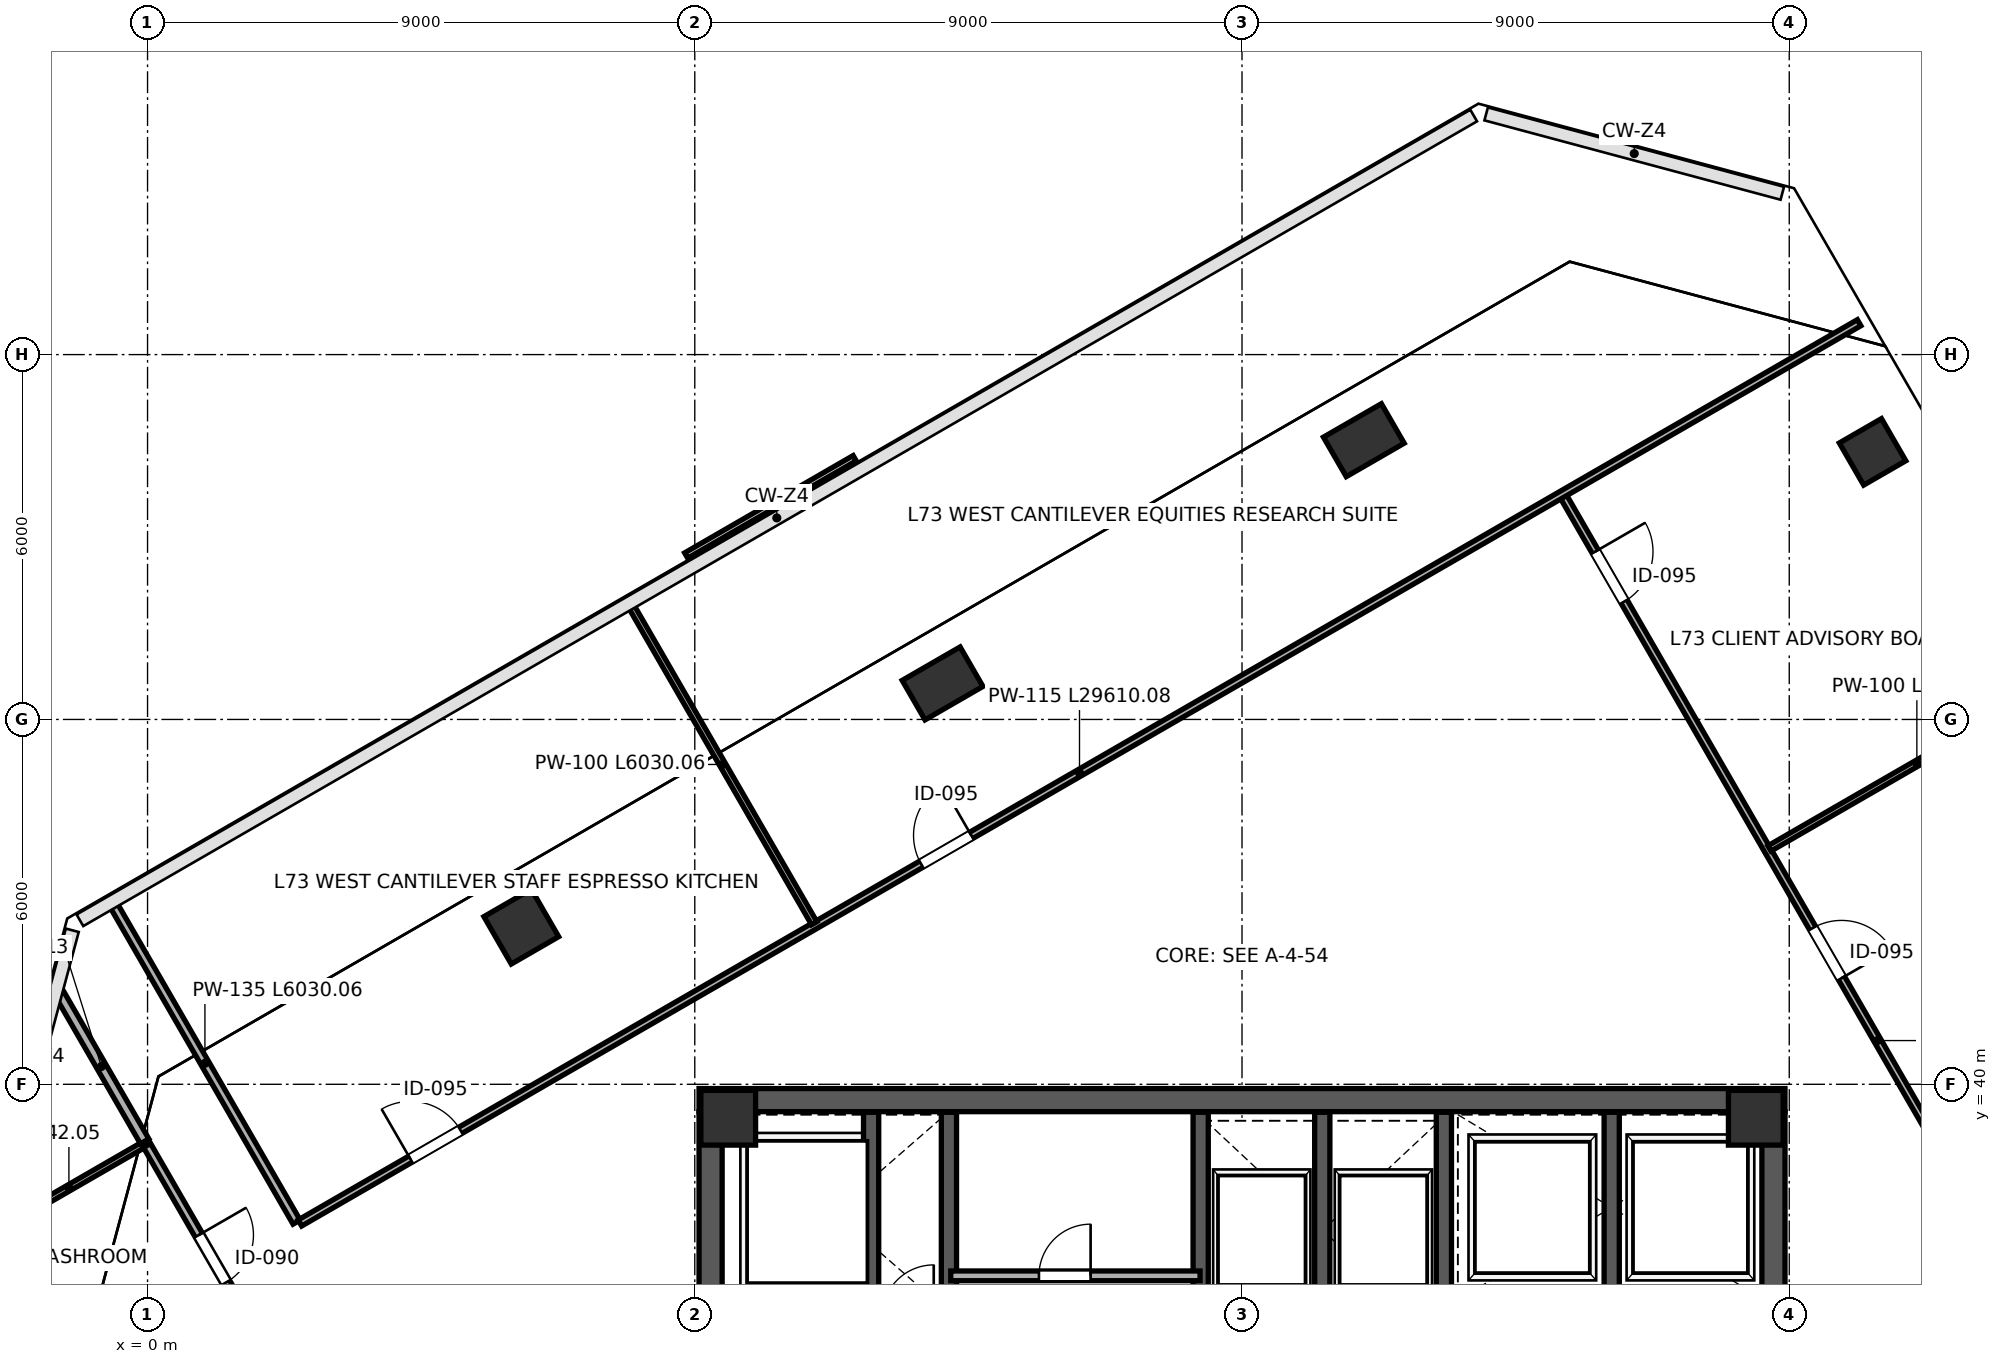
"""IFC4 building model, lengths in metres.
Left out: names, types, materials, properties, quantities, classifications, styles, units other than length and angle.
Written with IfcOpenShell. Run it as: python <this file> out.ifc"""

import sys

from ifc_helpers import new_model, si_unit, direction, frame, frame_2d, origin, origin_2d, place, context, subcontext, project, spatial, rectangle, extrude, clip, halfspace, source, transform, mapped, element, fill, save


model = new_model("IFC4")
c1 = context("Model", 3, precision=1e-05, world=origin(), true_north=direction((0.0, 1.0)))
c2 = subcontext(c1, "Body", "Model", "MODEL_VIEW")
j1 = project(units=[si_unit("LENGTHUNIT", "METRE"), si_unit("PLANEANGLEUNIT", "RADIAN")], contexts=[c1])
p1 = place(None, origin())
s1 = spatial("IfcSite", under=j1, at=p1, CompositionType="ELEMENT")
p2 = place(p1, origin())
s2 = spatial("IfcBuilding", under=s1, at=p2, CompositionType="ELEMENT")
p3 = place(p2, frame((0.0, 0.0, 324.0)))
s3 = spatial("IfcBuildingStorey", under=s2, at=p3, CompositionType="ELEMENT", Elevation=324.0)
m1 = source(origin(), c2, "Body", "SweptSolid", [
    extrude(rectangle(XDim=0.9, YDim=0.9, at=origin_2d()), origin(), (0.0, 0.0, 1.0), 4.198),
])
for number, where, z_axis, x_axis in (
    (1, (9.55, 39.45, 0.001), (0.0, 0.0, 1.0), (1.0, 0.0, 0.0)),
    (2, (26.45, 39.45, 0.001), (0.0, 0.0, 1.0), (1.0, 0.0, 0.0)),
):
    element("IfcColumn", number, at=place(p3, frame(where, z_axis=z_axis, x_axis=x_axis)), inside=s3, PredefinedType="COLUMN", context=c2, shape_type="MappedRepresentation", body=[
        mapped(m1, transform((0.0, 0.0, 0.0), scale=1.0)),
    ])
p4 = place(p3, frame((28.37, 50.4, 0.0), z_axis=(0.185732133875, -0.074042249015, 0.979806776771), x_axis=(-0.973368515453, -0.150232230162, 0.173158915868)))
e3 = element("IfcColumn", 3, at=p4, inside=s3, PredefinedType="COLUMN", context=c2, shape_type="Clipping", body=[
    clip(clip(extrude(rectangle(XDim=0.8, YDim=0.8, at=origin_2d()), origin(), (0.0, 0.0, 1.0), 4.287), halfspace(frame((0.0, 0.0, 0.112), z_axis=(0.0, 0.0, -1.0), x_axis=(1.0, 0.0, 0.0)), False)), halfspace(frame((0.0, 0.0, 4.174), z_axis=(0.0, 0.0, 1.0), x_axis=(1.0, 0.0, 0.0)), False)),
])
p5 = place(p3, frame((6.147, 42.593, 0.0), z_axis=(0.11139667023, 0.15419764496, 0.981740224372), x_axis=(-0.092584145067, -0.981981963783, 0.164741005482)))
e4 = element("IfcColumn", 4, at=p5, inside=s3, PredefinedType="COLUMN", context=c2, shape_type="Clipping", body=[
    clip(clip(extrude(rectangle(XDim=0.9, YDim=0.9, at=origin_2d()), origin(), (0.0, 0.0, 1.0), 4.278), halfspace(frame((0.0, 0.0, 0.12), z_axis=(0.0, 0.0, -1.0), x_axis=(1.0, 0.0, 0.0)), False)), halfspace(frame((0.0, 0.0, 4.158), z_axis=(0.0, 0.0, 1.0), x_axis=(1.0, 0.0, 0.0)), False)),
])
p6 = place(p3, frame((13.075, 46.593, 0.0), z_axis=(0.151163602868, 0.082910945816, 0.985025553086), x_axis=(-0.507491019711, -0.848622041952, 0.149310062709)))
e5 = element("IfcColumn", 5, at=p6, inside=s3, PredefinedType="PILASTER", context=c2, shape_type="Clipping", body=[
    clip(clip(extrude(rectangle(XDim=0.75, YDim=1.1, at=origin_2d()), origin(), (0.0, 0.0, 1.0), 4.264), halfspace(frame((0.0, 0.0, 0.106), z_axis=(0.0, 0.0, -1.0), x_axis=(1.0, 0.0, 0.0)), False)), halfspace(frame((0.0, 0.0, 4.158), z_axis=(0.0, 0.0, 1.0), x_axis=(1.0, 0.0, 0.0)), False)),
])
p7 = place(p3, frame((20.003, 50.593, 0.0), z_axis=(0.189921418402, 0.011128208109, 0.981736226191), x_axis=(-0.819506066676, -0.54887550505, 0.16475887423)))
e6 = element("IfcColumn", 6, at=p7, inside=s3, PredefinedType="PILASTER", context=c2, shape_type="Clipping", body=[
    clip(clip(extrude(rectangle(XDim=0.75, YDim=1.1, at=origin_2d()), origin(), (0.0, 0.0, 1.0), 4.278), halfspace(frame((0.0, 0.0, 0.117), z_axis=(0.0, 0.0, -1.0), x_axis=(1.0, 0.0, 0.0)), False)), halfspace(frame((0.0, 0.0, 4.161), z_axis=(0.0, 0.0, 1.0), x_axis=(1.0, 0.0, 0.0)), False)),
])
p8 = place(p3, frame((9.26, 24.45, 0.0), z_axis=(0.0, 0.0, 1.0), x_axis=(0.0, 1.0, 0.0)))
e7 = element("IfcWall", 7, at=p8, inside=s3, PredefinedType="SHEAR", context=c2, shape_type="SweptSolid", body=[
    extrude(rectangle(XDim=15.1, YDim=0.38, at=frame_2d((7.55, 0.0))), origin(), (0.0, 0.0, 1.0), 3.96),
])
p9 = place(p8, frame((8.7, 0.0, 0.0)))
e8 = element("IfcOpeningElement", 8, at=p9, cuts=e7, PredefinedType="OPENING", context=c2, shape_type="SweptSolid", body=[
    extrude(rectangle(XDim=1.15, YDim=2.2, at=frame_2d((0.575, 1.1))), frame((0.0, 0.2, 0.0), z_axis=(0.0, -1.0, 0.0), x_axis=(1.0, 0.0, 0.0)), (0.0, 0.0, 1.0), 0.4),
])
p10 = place(p3, frame((26.74, 24.45, 0.0), z_axis=(0.0, 0.0, 1.0), x_axis=(0.0, 1.0, 0.0)))
e9 = element("IfcWall", 9, at=p10, inside=s3, PredefinedType="SHEAR", context=c2, shape_type="SweptSolid", body=[
    extrude(rectangle(XDim=15.1, YDim=0.38, at=frame_2d((7.55, 0.0))), origin(), (0.0, 0.0, 1.0), 3.96),
])
p11 = place(p10, frame((8.6, 0.0, 0.0)))
e10 = element("IfcOpeningElement", 10, at=p11, cuts=e9, PredefinedType="OPENING", context=c2, shape_type="SweptSolid", body=[
    extrude(rectangle(XDim=1.15, YDim=2.2, at=frame_2d((0.575, 1.1))), frame((0.0, 0.2, 0.0), z_axis=(0.0, -1.0, 0.0), x_axis=(1.0, 0.0, 0.0)), (0.0, 0.0, 1.0), 0.4),
])
p12 = place(p3, frame((9.07, 39.74, 0.0), z_axis=(0.0, 0.0, 1.0), x_axis=(1.0, 0.0, 0.0)))
e11 = element("IfcWall", 11, at=p12, inside=s3, PredefinedType="SHEAR", context=c2, shape_type="SweptSolid", body=[
    extrude(rectangle(XDim=17.86, YDim=0.38, at=frame_2d((8.93, 0.0))), origin(), (0.0, 0.0, 1.0), 3.96),
])
p13 = place(p3, frame((21.32, 32.12, 0.0), z_axis=(0.0, 0.0, 1.0), x_axis=(0.0, 1.0, 0.0)))
e12 = element("IfcWall", 12, at=p13, inside=s3, PredefinedType="SHEAR", context=c2, shape_type="SweptSolid", body=[
    extrude(rectangle(XDim=7.42, YDim=0.25, at=frame_2d((3.71, 0.0))), origin(), (0.0, 0.0, 1.0), 3.96),
])
p14 = place(p13, frame((1.4, 0.0, 0.0)))
e13 = element("IfcOpeningElement", 13, at=p14, cuts=e12, PredefinedType="OPENING", context=c2, shape_type="SweptSolid", body=[
    extrude(rectangle(XDim=1.15, YDim=2.2, at=frame_2d((0.575, 1.1))), frame((0.0, 0.135, 0.0), z_axis=(0.0, -1.0, 0.0), x_axis=(1.0, 0.0, 0.0)), (0.0, 0.0, 1.0), 0.27),
])
p15 = place(p3, frame((11.9, 36.31, 0.0), z_axis=(0.0, 0.0, 1.0), x_axis=(0.0, 1.0, 0.0)))
e14 = element("IfcWall", 14, at=p15, inside=s3, PredefinedType="SHEAR", context=c2, shape_type="SweptSolid", body=[
    extrude(rectangle(XDim=3.23, YDim=0.25, at=frame_2d((1.615, 0.0))), origin(), (0.0, 0.0, 1.0), 3.96),
])
p16 = place(p3, frame((24.08, 36.48, 0.0), z_axis=(0.0, 0.0, 1.0), x_axis=(0.0, 1.0, 0.0)))
e15 = element("IfcWall", 15, at=p16, inside=s3, PredefinedType="SHEAR", context=c2, shape_type="SweptSolid", body=[
    extrude(rectangle(XDim=3.06, YDim=0.25, at=frame_2d((1.53, 0.0))), origin(), (0.0, 0.0, 1.0), 3.96),
])
p17 = place(p3, frame((13.18, 36.2, 0.0), z_axis=(0.0, 0.0, 1.0), x_axis=(0.0, 1.0, 0.0)))
e16 = element("IfcWall", 16, at=p17, inside=s3, PredefinedType="SHEAR", context=c2, shape_type="SweptSolid", body=[
    extrude(rectangle(XDim=3.34, YDim=0.25, at=frame_2d((1.67, 0.0))), origin(), (0.0, 0.0, 1.0), 3.96),
])
for number, where, z_axis, x_axis in (
    (17, (17.32, 35.81, 0.0), (0.0, 0.0, 1.0), (0.0, 1.0, 0.0)),
    (18, (19.32, 35.81, 0.0), (0.0, 0.0, 1.0), (0.0, 1.0, 0.0)),
):
    element("IfcWall", number, at=place(p3, frame(where, z_axis=z_axis, x_axis=x_axis)), inside=s3, PredefinedType="SHEAR", context=c2, shape_type="SweptSolid", body=[
        extrude(rectangle(XDim=3.73, YDim=0.25, at=frame_2d((1.865, 0.0))), origin(), (0.0, 0.0, 1.0), 3.96),
    ])
p18 = place(p3, frame((13.21, 36.85, 0.0), z_axis=(0.0, 0.0, 1.0), x_axis=(1.0, 0.0, 0.0)))
e19 = element("IfcWall", 19, at=p18, inside=s3, PredefinedType="PARTITIONING", context=c2, shape_type="SweptSolid", body=[
    extrude(rectangle(XDim=4.1, YDim=0.16, at=frame_2d((2.05, 0.0))), origin(), (0.0, 0.0, 1.0), 3.96),
])
p19 = place(p18, frame((1.45, 0.0, 0.0)))
e20 = element("IfcOpeningElement", 20, at=p19, cuts=e19, PredefinedType="OPENING", context=c2, shape_type="SweptSolid", body=[
    extrude(rectangle(XDim=0.85, YDim=2.1, at=frame_2d((0.425, 1.05))), frame((0.0, 0.09, 0.0), z_axis=(0.0, -1.0, 0.0), x_axis=(1.0, 0.0, 0.0)), (0.0, 0.0, 1.0), 0.18),
])
p20 = place(p3, frame((-2.524, 37.586, 0.0), z_axis=(0.0, 0.0, 1.0), x_axis=(0.866019653938, 0.500009958894, 0.0)))
e21 = element("IfcWall", 21, at=p20, inside=s3, PredefinedType="PARTITIONING", context=c2, shape_type="SweptSolid", body=[
    extrude(rectangle(XDim=2.842, YDim=0.1, at=frame_2d((1.421, 0.0))), origin(), (0.0, 0.0, 1.0), 3.96),
])
p21 = place(p3, frame((-1.469, 41.523, 0.0), z_axis=(0.0, 0.0, 1.0), x_axis=(0.499945532396, -0.866056848387, 0.0)))
e22 = element("IfcWall", 22, at=p21, inside=s3, PredefinedType="PARTITIONING", context=c2, shape_type="SweptSolid", body=[
    extrude(rectangle(XDim=2.842, YDim=0.16, at=frame_2d((1.421, 0.0))), origin(), (0.0, 0.0, 1.0), 3.96),
])
p22 = place(p3, frame((-0.008, 38.993, 0.0), z_axis=(0.0, 0.0, 1.0), x_axis=(0.49998923004, -0.866031621735, 0.0)))
e23 = element("IfcWall", 23, at=p22, inside=s3, PredefinedType="PARTITIONING", context=c2, shape_type="SweptSolid", body=[
    extrude(rectangle(XDim=7.42, YDim=0.135, at=frame_2d((3.71, 0.0))), origin(), (0.0, 0.0, 1.0), 3.96),
])
p23 = place(p22, frame((1.7, 0.0, 0.0)))
e24 = element("IfcOpeningElement", 24, at=p23, cuts=e23, PredefinedType="OPENING", context=c2, shape_type="SweptSolid", body=[
    extrude(rectangle(XDim=0.9, YDim=2.15, at=frame_2d((0.45, 1.075))), frame((0.0, 0.078, 0.0), z_axis=(0.0, -1.0, 0.0), x_axis=(1.0, 0.0, 0.0)), (0.0, 0.0, 1.0), 0.155),
])
p24 = place(p22, frame((5.0, 0.0, 0.0)))
e25 = element("IfcOpeningElement", 25, at=p24, cuts=e23, PredefinedType="OPENING", context=c2, shape_type="SweptSolid", body=[
    extrude(rectangle(XDim=0.95, YDim=2.15, at=frame_2d((0.475, 1.075))), frame((0.0, 0.078, 0.0), z_axis=(0.0, -1.0, 0.0), x_axis=(1.0, 0.0, 0.0)), (0.0, 0.0, 1.0), 0.155),
])
p25 = place(p3, frame((23.284, 49.669, 0.0), z_axis=(0.0, 0.0, 1.0), x_axis=(0.500004637929, -0.866022726058, 0.0)))
e26 = element("IfcWall", 26, at=p25, inside=s3, PredefinedType="PARTITIONING", context=c2, shape_type="SweptSolid", body=[
    extrude(rectangle(XDim=20.67, YDim=0.115, at=frame_2d((10.335, 0.0))), origin(), (0.0, 0.0, 1.0), 3.96),
])
p26 = place(p25, frame((1.05, 0.0, 0.0)))
e27 = element("IfcOpeningElement", 27, at=p26, cuts=e26, PredefinedType="OPENING", context=c2, shape_type="SweptSolid", body=[
    extrude(rectangle(XDim=0.95, YDim=2.15, at=frame_2d((0.475, 1.075))), frame((0.0, 0.067, 0.0), z_axis=(0.0, -1.0, 0.0), x_axis=(1.0, 0.0, 0.0)), (0.0, 0.0, 1.0), 0.135),
])
p27 = place(p25, frame((8.2, 0.0, 0.0)))
e28 = element("IfcOpeningElement", 28, at=p27, cuts=e26, PredefinedType="OPENING", context=c2, shape_type="SweptSolid", body=[
    extrude(rectangle(XDim=0.95, YDim=2.15, at=frame_2d((0.475, 1.075))), frame((0.0, 0.067, 0.0), z_axis=(0.0, -1.0, 0.0), x_axis=(1.0, 0.0, 0.0)), (0.0, 0.0, 1.0), 0.135),
])
p28 = place(p3, frame((26.674, 43.878, 0.0), z_axis=(0.0, 0.0, 1.0), x_axis=(0.866026594901, 0.49999793692, 0.0)))
e29 = element("IfcWall", 29, at=p28, inside=s3, PredefinedType="PARTITIONING", context=c2, shape_type="SweptSolid", body=[
    extrude(rectangle(XDim=5.6, YDim=0.1, at=frame_2d((2.8, 0.0))), origin(), (0.0, 0.0, 1.0), 3.295),
])
p29 = place(p3, frame((-0.564, 42.956, 0.0), z_axis=(0.0, 0.0, 1.0), x_axis=(0.500014506688, -0.866017028182, 0.0)))
e30 = element("IfcWall", 30, at=p29, inside=s3, PredefinedType="PARTITIONING", context=c2, shape_type="SweptSolid", body=[
    extrude(rectangle(XDim=6.03, YDim=0.135, at=frame_2d((3.015, 0.0))), origin(), (0.0, 0.0, 1.0), 3.96),
])
p30 = place(p3, frame((2.506, 37.719, 0.0), z_axis=(0.0, 0.0, 1.0), x_axis=(0.866023290802, 0.500003659775, 0.0)))
e31 = element("IfcWall", 31, at=p30, inside=s3, PredefinedType="PARTITIONING", context=c2, shape_type="SweptSolid", body=[
    extrude(rectangle(XDim=29.61, YDim=0.115, at=frame_2d((14.805, 0.0))), origin(), (0.0, 0.0, 1.0), 3.96),
])
p31 = place(p30, frame((2.1, 0.0, 0.0)))
e32 = element("IfcOpeningElement", 32, at=p31, cuts=e31, PredefinedType="OPENING", context=c2, shape_type="SweptSolid", body=[
    extrude(rectangle(XDim=0.95, YDim=2.15, at=frame_2d((0.475, 1.075))), frame((0.0, 0.067, 0.0), z_axis=(0.0, -1.0, 0.0), x_axis=(1.0, 0.0, 0.0)), (0.0, 0.0, 1.0), 0.135),
])
p32 = place(p30, frame((11.8, 0.0, 0.0)))
e33 = element("IfcOpeningElement", 33, at=p32, cuts=e31, PredefinedType="OPENING", context=c2, shape_type="SweptSolid", body=[
    extrude(rectangle(XDim=0.95, YDim=2.15, at=frame_2d((0.475, 1.075))), frame((0.0, 0.067, 0.0), z_axis=(0.0, -1.0, 0.0), x_axis=(1.0, 0.0, 0.0)), (0.0, 0.0, 1.0), 0.135),
])
p33 = place(p3, frame((7.949, 47.871, 0.0), z_axis=(0.0, 0.0, 1.0), x_axis=(0.4999841411, -0.866034559731, 0.0)))
e34 = element("IfcWall", 34, at=p33, inside=s3, PredefinedType="PARTITIONING", context=c2, shape_type="SweptSolid", body=[
    extrude(rectangle(XDim=6.03, YDim=0.1, at=frame_2d((3.015, 0.0))), origin(), (0.0, 0.0, 1.0), 3.295),
])
m2 = source(origin(), c2, "Body", "SweptSolid", [
    extrude(rectangle(XDim=0.85, YDim=2.1, at=frame_2d((0.425, 1.05))), frame((0.0, 0.025, 0.0), z_axis=(0.0, -1.0, 0.0), x_axis=(1.0, 0.0, 0.0)), (0.0, 0.0, 1.0), 0.05),
])
p34 = place(p19, origin())
e35 = element("IfcDoor", 35, at=p34, inside=s3, OperationType="SINGLE_SWING_RIGHT", PredefinedType="DOOR", context=c2, shape_type="MappedRepresentation", body=[
    mapped(m2, transform((0.0, 0.0, 0.0), scale=1.0)),
])
fill(e20, e35)
m3 = source(origin(), c2, "Body", "SweptSolid", [
    extrude(rectangle(XDim=0.9, YDim=2.15, at=frame_2d((0.45, 1.075))), frame((0.0, 0.025, 0.0), z_axis=(0.0, -1.0, 0.0), x_axis=(1.0, 0.0, 0.0)), (0.0, 0.0, 1.0), 0.05),
])
p35 = place(p23, origin())
e36 = element("IfcDoor", 36, at=p35, inside=s3, OperationType="SINGLE_SWING_LEFT", PredefinedType="DOOR", context=c2, shape_type="MappedRepresentation", body=[
    mapped(m3, transform((0.0, 0.0, 0.0), scale=1.0)),
])
fill(e24, e36)
m4 = source(origin(), c2, "Body", "SweptSolid", [
    extrude(rectangle(XDim=0.95, YDim=2.15, at=frame_2d((0.475, 1.075))), frame((0.0, 0.025, 0.0), z_axis=(0.0, -1.0, 0.0), x_axis=(1.0, 0.0, 0.0)), (0.0, 0.0, 1.0), 0.05),
])
p36 = place(p26, origin())
e37 = element("IfcDoor", 37, at=p36, inside=s3, OperationType="SINGLE_SWING_LEFT", PredefinedType="DOOR", context=c2, shape_type="MappedRepresentation", body=[
    mapped(m4, transform((0.0, 0.0, 0.0), scale=1.0)),
])
fill(e27, e37)
p37 = place(p27, origin())
e38 = element("IfcDoor", 38, at=p37, inside=s3, OperationType="SINGLE_SWING_RIGHT", PredefinedType="DOOR", context=c2, shape_type="MappedRepresentation", body=[
    mapped(m4, transform((0.0, 0.0, 0.0), scale=1.0)),
])
fill(e28, e38)
p38 = place(p31, origin())
e39 = element("IfcDoor", 39, at=p38, inside=s3, OperationType="SINGLE_SWING_LEFT", PredefinedType="DOOR", context=c2, shape_type="MappedRepresentation", body=[
    mapped(m4, transform((0.0, 0.0, 0.0), scale=1.0)),
])
fill(e32, e39)
p39 = place(p32, origin())
e40 = element("IfcDoor", 40, at=p39, inside=s3, OperationType="SINGLE_SWING_RIGHT", PredefinedType="DOOR", context=c2, shape_type="MappedRepresentation", body=[
    mapped(m4, transform((0.0, 0.0, 0.0), scale=1.0)),
])
fill(e33, e40)
save(model, sys.argv[1])
